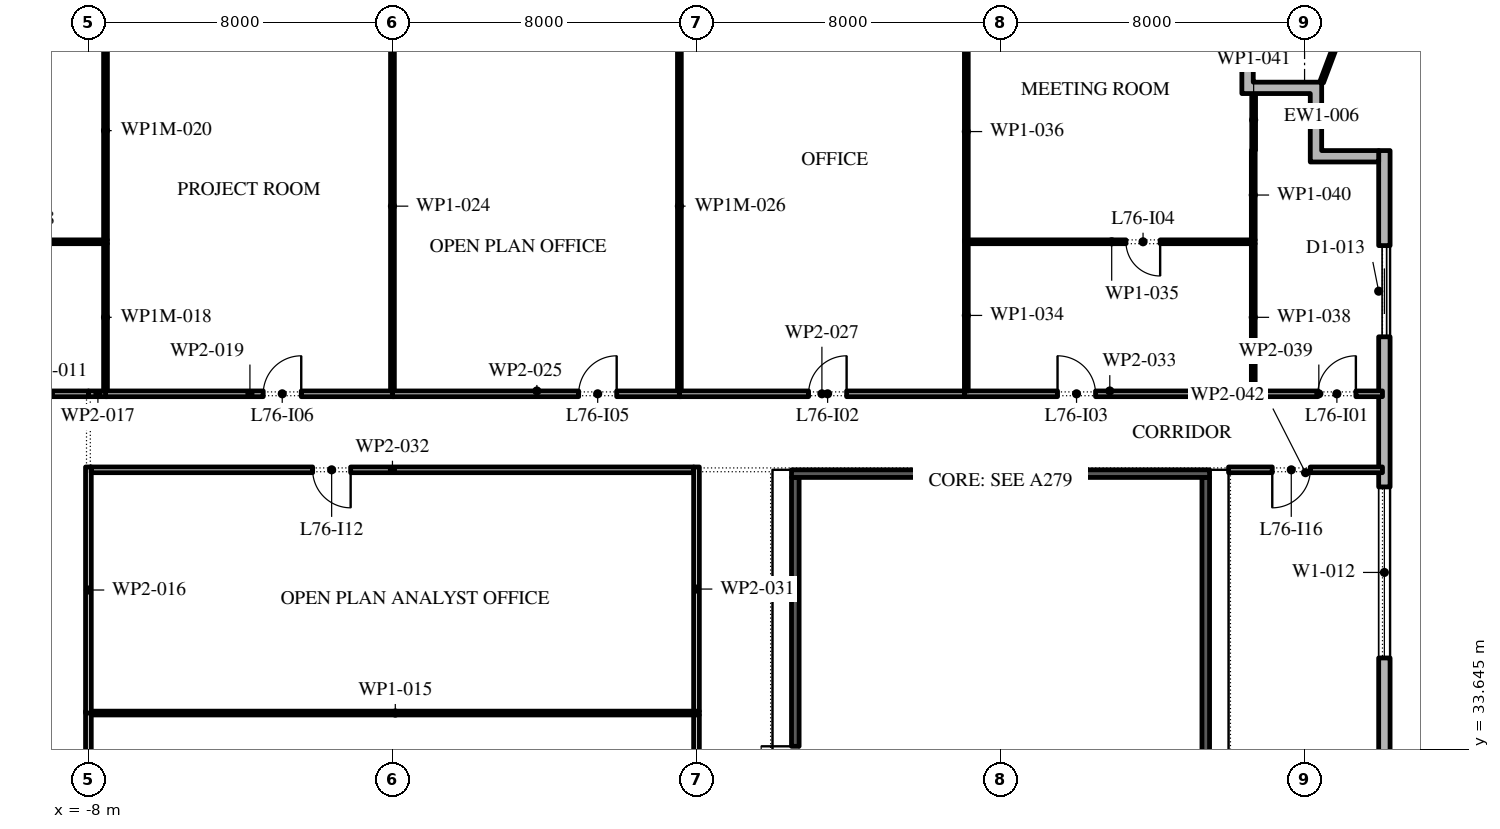
"""IFC4 building model, lengths in metres.
Left out: names, types, materials, properties, quantities, classifications, styles, units other than length and angle.
Written with IfcOpenShell. Run it as: python <this file> out.ifc"""

import sys

from ifc_helpers import new_model, si_unit, direction, frame, frame_2d, origin, place, context, subcontext, project, spatial, polyline, rectangle, outline, extrude, element, fill, save


model = new_model("IFC4")
c1 = context("Model", 3, precision=1e-05, world=origin(), true_north=direction((0.0, 1.0)))
c2 = subcontext(c1, "Body", "Model", "MODEL_VIEW")
j1 = project(units=[si_unit("LENGTHUNIT", "METRE"), si_unit("PLANEANGLEUNIT", "RADIAN")], contexts=[c1])
p1 = place(None, origin())
s1 = spatial("IfcSite", under=j1, at=p1, CompositionType="ELEMENT")
p2 = place(p1, origin())
s2 = spatial("IfcBuilding", under=s1, at=p2, CompositionType="ELEMENT")
p3 = place(p2, frame((0.0, 0.0, 346.8)))
s3 = spatial("IfcBuildingStorey", under=s2, at=p3, CompositionType="ELEMENT", Elevation=346.8)
p4 = place(p3, frame((26.1, -2.1, 0.0), z_axis=(0.0, 0.0, 1.0), x_axis=(0.0, 1.0, 0.0)))
e1 = element("IfcWall", 1, at=p4, inside=s3, PredefinedType="STANDARD", context=c2, shape_type="SweptSolid", body=[
    extrude(rectangle(XDim=51.5, YDim=0.3, at=frame_2d((25.75, 0.0))), origin(), (0.0, 0.0, 1.0), 4.0),
])
p5 = place(p4, frame((1.3, 0.0, 0.45)))
e2 = element("IfcOpeningElement", 2, at=p5, cuts=e1, PredefinedType="OPENING", context=c2, shape_type="SweptSolid", body=[
    extrude(rectangle(XDim=4.5, YDim=3.05, at=frame_2d((2.25, 1.525))), frame((0.0, 0.16, 0.0), z_axis=(0.0, -1.0, 0.0), x_axis=(1.0, 0.0, 0.0)), (0.0, 0.0, 1.0), 0.32),
])
p6 = place(p4, frame((8.55, 0.0, 0.45)))
e3 = element("IfcOpeningElement", 3, at=p6, cuts=e1, PredefinedType="OPENING", context=c2, shape_type="SweptSolid", body=[
    extrude(rectangle(XDim=4.5, YDim=3.05, at=frame_2d((2.25, 1.525))), frame((0.0, 0.16, 0.0), z_axis=(0.0, -1.0, 0.0), x_axis=(1.0, 0.0, 0.0)), (0.0, 0.0, 1.0), 0.32),
])
p7 = place(p4, frame((17.0, 0.0, 0.0)))
e4 = element("IfcOpeningElement", 4, at=p7, cuts=e1, PredefinedType="OPENING", context=c2, shape_type="SweptSolid", body=[
    extrude(rectangle(XDim=2.4, YDim=3.5, at=frame_2d((1.2, 1.75))), frame((0.0, 0.16, 0.0), z_axis=(0.0, -1.0, 0.0), x_axis=(1.0, 0.0, 0.0)), (0.0, 0.0, 1.0), 0.32),
])
p8 = place(p4, frame((23.35, 0.0, 0.45)))
e5 = element("IfcOpeningElement", 5, at=p8, cuts=e1, PredefinedType="OPENING", context=c2, shape_type="SweptSolid", body=[
    extrude(rectangle(XDim=4.5, YDim=3.05, at=frame_2d((2.25, 1.525))), frame((0.0, 0.16, 0.0), z_axis=(0.0, -1.0, 0.0), x_axis=(1.0, 0.0, 0.0)), (0.0, 0.0, 1.0), 0.32),
])
p9 = place(p4, frame((30.75, 0.0, 0.45)))
e6 = element("IfcOpeningElement", 6, at=p9, cuts=e1, PredefinedType="OPENING", context=c2, shape_type="SweptSolid", body=[
    extrude(rectangle(XDim=4.5, YDim=3.05, at=frame_2d((2.25, 1.525))), frame((0.0, 0.16, 0.0), z_axis=(0.0, -1.0, 0.0), x_axis=(1.0, 0.0, 0.0)), (0.0, 0.0, 1.0), 0.32),
])
p10 = place(p4, frame((38.15, 0.0, 0.45)))
e7 = element("IfcOpeningElement", 7, at=p10, cuts=e1, PredefinedType="OPENING", context=c2, shape_type="SweptSolid", body=[
    extrude(rectangle(XDim=4.5, YDim=3.05, at=frame_2d((2.25, 1.525))), frame((0.0, 0.16, 0.0), z_axis=(0.0, -1.0, 0.0), x_axis=(1.0, 0.0, 0.0)), (0.0, 0.0, 1.0), 0.32),
])
p11 = place(p4, frame((46.6, 0.0, 0.0)))
e8 = element("IfcOpeningElement", 8, at=p11, cuts=e1, PredefinedType="OPENING", context=c2, shape_type="SweptSolid", body=[
    extrude(rectangle(XDim=2.4, YDim=3.5, at=frame_2d((1.2, 1.75))), frame((0.0, 0.16, 0.0), z_axis=(0.0, -1.0, 0.0), x_axis=(1.0, 0.0, 0.0)), (0.0, 0.0, 1.0), 0.32),
])
p12 = place(p3, origin())
e9 = element("IfcWall", 9, at=p12, inside=s3, PredefinedType="STANDARD", context=c2, shape_type="SweptSolid", body=[
    extrude(outline(polyline([(24.15, 50.9), (22.35, 50.9), (22.35, 53.0), (22.65, 53.0), (22.65, 51.2), (24.45, 51.2), (24.45, 49.4), (25.95, 49.4), (25.95, 49.1), (24.15, 49.1), (24.15, 50.9)])), origin(), (0.0, 0.0, 1.0), 4.0),
])
p13 = place(p3, frame((24.45, 51.2, -0.05), z_axis=(0.0, 0.0, 1.0), x_axis=(0.352001800812, 0.93599932277, 0.0)))
e10 = element("IfcWall", 10, at=p13, inside=s3, PredefinedType="STANDARD", context=c2, shape_type="SweptSolid", body=[
    extrude(rectangle(XDim=6.091, YDim=0.1, at=frame_2d((3.045, 0.0))), origin(), (0.0, 0.0, 1.0), 4.05),
])
p14 = place(p3, frame((21.4, 25.75, 0.0), z_axis=(0.0, 0.0, 1.0), x_axis=(0.0, 1.0, 0.0)))
e11 = element("IfcWall", 11, at=p14, inside=s3, PredefinedType="SHEAR", context=c2, shape_type="SweptSolid", body=[
    extrude(rectangle(XDim=15.05, YDim=0.2, at=frame_2d((7.525, 0.0))), origin(), (0.0, 0.0, 1.0), 4.0),
])
p15 = place(p3, frame((10.6, 25.75, 0.0), z_axis=(0.0, 0.0, 1.0), x_axis=(0.0, 1.0, 0.0)))
e12 = element("IfcWall", 12, at=p15, inside=s3, PredefinedType="SHEAR", context=c2, shape_type="SweptSolid", body=[
    extrude(rectangle(XDim=15.05, YDim=0.2, at=frame_2d((7.525, 0.0))), origin(), (0.0, 0.0, 1.0), 4.0),
])
p16 = place(p15, frame((7.075, 0.0, 0.0)))
e13 = element("IfcOpeningElement", 13, at=p16, cuts=e12, PredefinedType="OPENING", context=c2, shape_type="SweptSolid", body=[
    extrude(rectangle(XDim=0.9, YDim=2.1, at=frame_2d((0.45, 1.05))), frame((0.0, 0.11, 0.0), z_axis=(0.0, -1.0, 0.0), x_axis=(1.0, 0.0, 0.0)), (0.0, 0.0, 1.0), 0.22),
])
p17 = place(p3, frame((10.5, 40.9, 0.0), z_axis=(0.0, 0.0, 1.0), x_axis=(1.0, 0.0, 0.0)))
e14 = element("IfcWall", 14, at=p17, inside=s3, PredefinedType="SHEAR", context=c2, shape_type="SweptSolid", body=[
    extrude(rectangle(XDim=11.0, YDim=0.2, at=frame_2d((5.5, 0.0))), origin(), (0.0, 0.0, 1.0), 4.0),
])
p18 = place(p3, frame((-15.05, 47.0, 0.0), z_axis=(0.0, 0.0, 1.0), x_axis=(1.0, 0.0, 0.0)))
e15 = element("IfcWall", 15, at=p18, inside=s3, PredefinedType="PARTITIONING", context=c2, shape_type="SweptSolid", body=[
    extrude(rectangle(XDim=7.55, YDim=0.1, at=frame_2d((3.775, 0.0))), origin(), (0.0, 0.0, 1.0), 4.0),
])
p19 = place(p18, frame((4.9, 0.0, 0.0)))
e16 = element("IfcOpeningElement", 16, at=p19, cuts=e15, PredefinedType="OPENING", context=c2, shape_type="SweptSolid", body=[
    extrude(rectangle(XDim=0.9, YDim=2.1, at=frame_2d((0.45, 1.05))), frame((0.0, 0.06, 0.0), z_axis=(0.0, -1.0, 0.0), x_axis=(1.0, 0.0, 0.0)), (0.0, 0.0, 1.0), 0.12),
])
p20 = place(p3, frame((-10.0, 43.0, 0.0), z_axis=(0.0, 0.0, 1.0), x_axis=(1.0, 0.0, 0.0)))
e17 = element("IfcWall", 17, at=p20, inside=s3, PredefinedType="PARTITIONING", context=c2, shape_type="SweptSolid", body=[
    extrude(rectangle(XDim=2.0, YDim=0.15, at=frame_2d((1.0, 0.0))), origin(), (0.0, 0.0, 1.0), 4.0),
])
p21 = place(p3, frame((-8.0, 34.65, 0.0), z_axis=(0.0, 0.0, 1.0), x_axis=(0.0, -1.0, 0.0)))
e18 = element("IfcWall", 18, at=p21, inside=s3, PredefinedType="PARTITIONING", context=c2, shape_type="SweptSolid", body=[
    extrude(rectangle(XDim=8.2, YDim=0.15, at=frame_2d((4.1, 0.0))), origin(), (0.0, 0.0, 1.0), 4.0),
])
p22 = place(p21, frame((2.0, 0.0, 0.0)))
e19 = element("IfcOpeningElement", 19, at=p22, cuts=e18, PredefinedType="OPENING", context=c2, shape_type="SweptSolid", body=[
    extrude(rectangle(XDim=1.0, YDim=2.1, at=frame_2d((0.5, 1.05))), frame((0.0, 0.085, 0.0), z_axis=(0.0, -1.0, 0.0), x_axis=(1.0, 0.0, 0.0)), (0.0, 0.0, 1.0), 0.17),
])
p23 = place(p3, frame((-7.925, 34.6, 0.0), z_axis=(0.0, 0.0, 1.0), x_axis=(1.0, 0.0, 0.0)))
e20 = element("IfcWall", 20, at=p23, inside=s3, PredefinedType="PARTITIONING", context=c2, shape_type="SweptSolid", body=[
    extrude(rectangle(XDim=16.0, YDim=0.1, at=frame_2d((8.0, 0.0))), origin(), (0.0, 0.0, 1.0), 4.0),
])
p24 = place(p3, frame((-8.0, 41.075, 0.0), z_axis=(0.0, 0.0, 1.0), x_axis=(0.0, -1.0, 0.0)))
e21 = element("IfcWall", 21, at=p24, inside=s3, PredefinedType="PARTITIONING", context=c2, shape_type="SweptSolid", body=[
    extrude(rectangle(XDim=6.475, YDim=0.15, at=frame_2d((3.237, 0.0))), origin(), (0.0, 0.0, 1.0), 4.0),
])
p25 = place(p3, frame((-8.0, 43.0, 0.0), z_axis=(0.0, 0.0, 1.0), x_axis=(1.0, 0.0, 0.0)))
e22 = element("IfcWall", 22, at=p25, inside=s3, PredefinedType="PARTITIONING", context=c2, shape_type="SweptSolid", body=[
    extrude(rectangle(XDim=0.5, YDim=0.15, at=frame_2d((0.25, 0.0))), origin(), (0.0, 0.0, 1.0), 4.0),
])
p26 = place(p3, frame((-7.55, 43.075, 0.0), z_axis=(0.0, 0.0, 1.0), x_axis=(0.0, 1.0, 0.0)))
e23 = element("IfcWall", 23, at=p26, inside=s3, PredefinedType="PARTITIONING", context=c2, shape_type="SweptSolid", body=[
    extrude(rectangle(XDim=3.875, YDim=0.1, at=frame_2d((1.938, 0.0))), origin(), (0.0, 0.0, 1.0), 3.096),
])
p27 = place(p3, frame((-7.55, 43.0, 0.0), z_axis=(0.0, 0.0, 1.0), x_axis=(1.0, 0.0, 0.0)))
e24 = element("IfcWall", 24, at=p27, inside=s3, PredefinedType="PARTITIONING", context=c2, shape_type="SweptSolid", body=[
    extrude(rectangle(XDim=7.6, YDim=0.15, at=frame_2d((3.8, 0.0))), origin(), (0.0, 0.0, 1.0), 4.0),
])
p28 = place(p27, frame((4.15, 0.0, 0.0)))
e25 = element("IfcOpeningElement", 25, at=p28, cuts=e24, PredefinedType="OPENING", context=c2, shape_type="SweptSolid", body=[
    extrude(rectangle(XDim=1.0, YDim=2.1, at=frame_2d((0.5, 1.05))), frame((0.0, 0.085, 0.0), z_axis=(0.0, -1.0, 0.0), x_axis=(1.0, 0.0, 0.0)), (0.0, 0.0, 1.0), 0.17),
])
p29 = place(p3, frame((-7.55, 47.05, 0.0), z_axis=(0.0, 0.0, 1.0), x_axis=(0.0, 1.0, 0.0)))
e26 = element("IfcWall", 26, at=p29, inside=s3, PredefinedType="PARTITIONING", context=c2, shape_type="SweptSolid", body=[
    extrude(rectangle(XDim=5.75, YDim=0.1, at=frame_2d((2.875, 0.0))), origin(), (0.0, 0.0, 1.0), 3.096),
])
p30 = place(p3, frame((0.0, 43.075, 0.0), z_axis=(0.0, 0.0, 1.0), x_axis=(0.0, 1.0, 0.0)))
e27 = element("IfcWall", 27, at=p30, inside=s3, PredefinedType="PARTITIONING", context=c2, shape_type="SweptSolid", body=[
    extrude(rectangle(XDim=9.725, YDim=0.1, at=frame_2d((4.863, 0.0))), origin(), (0.0, 0.0, 1.0), 4.0),
])
p31 = place(p3, frame((0.0, 43.0, 0.0), z_axis=(0.0, 0.0, 1.0), x_axis=(1.0, 0.0, 0.0)))
e28 = element("IfcWall", 28, at=p31, inside=s3, PredefinedType="PARTITIONING", context=c2, shape_type="SweptSolid", body=[
    extrude(rectangle(XDim=7.6, YDim=0.15, at=frame_2d((3.8, 0.0))), origin(), (0.0, 0.0, 1.0), 4.0),
])
p32 = place(p31, frame((4.9, 0.0, 0.0)))
e29 = element("IfcOpeningElement", 29, at=p32, cuts=e28, PredefinedType="OPENING", context=c2, shape_type="SweptSolid", body=[
    extrude(rectangle(XDim=1.0, YDim=2.1, at=frame_2d((0.5, 1.05))), frame((0.0, 0.085, 0.0), z_axis=(0.0, -1.0, 0.0), x_axis=(1.0, 0.0, 0.0)), (0.0, 0.0, 1.0), 0.17),
])
p33 = place(p3, frame((7.55, 43.075, 0.0), z_axis=(0.0, 0.0, 1.0), x_axis=(0.0, 1.0, 0.0)))
e30 = element("IfcWall", 30, at=p33, inside=s3, PredefinedType="PARTITIONING", context=c2, shape_type="SweptSolid", body=[
    extrude(rectangle(XDim=9.725, YDim=0.1, at=frame_2d((4.863, 0.0))), origin(), (0.0, 0.0, 1.0), 3.096),
])
p34 = place(p3, frame((7.55, 43.0, 0.0), z_axis=(0.0, 0.0, 1.0), x_axis=(1.0, 0.0, 0.0)))
e31 = element("IfcWall", 31, at=p34, inside=s3, PredefinedType="PARTITIONING", context=c2, shape_type="SweptSolid", body=[
    extrude(rectangle(XDim=7.5, YDim=0.15, at=frame_2d((3.75, 0.0))), origin(), (0.0, 0.0, 1.0), 4.0),
])
p35 = place(p34, frame((3.4, 0.0, 0.0)))
e32 = element("IfcOpeningElement", 32, at=p35, cuts=e31, PredefinedType="OPENING", context=c2, shape_type="SweptSolid", body=[
    extrude(rectangle(XDim=1.0, YDim=2.1, at=frame_2d((0.5, 1.05))), frame((0.0, 0.085, 0.0), z_axis=(0.0, -1.0, 0.0), x_axis=(1.0, 0.0, 0.0)), (0.0, 0.0, 1.0), 0.17),
])
p36 = place(p3, frame((8.0, 26.5, 0.0), z_axis=(0.0, 0.0, 1.0), x_axis=(0.0, 1.0, 0.0)))
e33 = element("IfcWall", 33, at=p36, inside=s3, PredefinedType="PARTITIONING", context=c2, shape_type="SweptSolid", body=[
    extrude(rectangle(XDim=8.05, YDim=0.15, at=frame_2d((4.025, 0.0))), origin(), (0.0, 0.0, 1.0), 4.0),
])
p37 = place(p3, frame((8.0, 34.65, 0.0), z_axis=(0.0, 0.0, 1.0), x_axis=(0.0, 1.0, 0.0)))
e34 = element("IfcWall", 34, at=p37, inside=s3, PredefinedType="PARTITIONING", context=c2, shape_type="SweptSolid", body=[
    extrude(rectangle(XDim=6.425, YDim=0.15, at=frame_2d((3.212, 0.0))), origin(), (0.0, 0.0, 1.0), 4.0),
])
p38 = place(p3, frame((7.925, 41.0, 0.0), z_axis=(0.0, 0.0, 1.0), x_axis=(-1.0, 0.0, 0.0)))
e35 = element("IfcWall", 35, at=p38, inside=s3, PredefinedType="PARTITIONING", context=c2, shape_type="SweptSolid", body=[
    extrude(rectangle(XDim=15.85, YDim=0.15, at=frame_2d((7.925, 0.0))), origin(), (0.0, 0.0, 1.0), 4.0),
])
p39 = place(p38, frame((9.025, 0.0, 0.0)))
e36 = element("IfcOpeningElement", 36, at=p39, cuts=e35, PredefinedType="OPENING", context=c2, shape_type="SweptSolid", body=[
    extrude(rectangle(XDim=1.0, YDim=2.1, at=frame_2d((0.5, 1.05))), frame((0.0, 0.085, 0.0), z_axis=(0.0, -1.0, 0.0), x_axis=(1.0, 0.0, 0.0)), (0.0, 0.0, 1.0), 0.17),
])
p40 = place(p3, frame((15.05, 43.0, 0.0), z_axis=(0.0, 0.0, 1.0), x_axis=(1.0, 0.0, 0.0)))
e37 = element("IfcWall", 37, at=p40, inside=s3, PredefinedType="PARTITIONING", context=c2, shape_type="SweptSolid", body=[
    extrude(rectangle(XDim=7.65, YDim=0.15, at=frame_2d((3.825, 0.0))), origin(), (0.0, 0.0, 1.0), 4.0),
])
p41 = place(p40, frame((2.45, 0.0, 0.0)))
e38 = element("IfcOpeningElement", 38, at=p41, cuts=e37, PredefinedType="OPENING", context=c2, shape_type="SweptSolid", body=[
    extrude(rectangle(XDim=1.0, YDim=2.1, at=frame_2d((0.5, 1.05))), frame((0.0, 0.085, 0.0), z_axis=(0.0, -1.0, 0.0), x_axis=(1.0, 0.0, 0.0)), (0.0, 0.0, 1.0), 0.17),
])
p42 = place(p3, frame((15.1, 47.05, 0.0), z_axis=(0.0, 0.0, 1.0), x_axis=(0.0, -1.0, 0.0)))
e39 = element("IfcWall", 39, at=p42, inside=s3, PredefinedType="PARTITIONING", context=c2, shape_type="SweptSolid", body=[
    extrude(rectangle(XDim=3.975, YDim=0.1, at=frame_2d((1.988, 0.0))), origin(), (0.0, 0.0, 1.0), 4.0),
])
p43 = place(p3, frame((15.15, 47.0, 0.0), z_axis=(0.0, 0.0, 1.0), x_axis=(1.0, 0.0, 0.0)))
e40 = element("IfcWall", 40, at=p43, inside=s3, PredefinedType="PARTITIONING", context=c2, shape_type="SweptSolid", body=[
    extrude(rectangle(XDim=7.55, YDim=0.1, at=frame_2d((3.775, 0.0))), origin(), (0.0, 0.0, 1.0), 4.0),
])
p44 = place(p43, frame((4.15, 0.0, 0.0)))
e41 = element("IfcOpeningElement", 41, at=p44, cuts=e40, PredefinedType="OPENING", context=c2, shape_type="SweptSolid", body=[
    extrude(rectangle(XDim=0.9, YDim=2.1, at=frame_2d((0.45, 1.05))), frame((0.0, 0.06, 0.0), z_axis=(0.0, -1.0, 0.0), x_axis=(1.0, 0.0, 0.0)), (0.0, 0.0, 1.0), 0.12),
])
p45 = place(p3, frame((15.1, 52.8, 0.0), z_axis=(0.0, 0.0, 1.0), x_axis=(0.0, -1.0, 0.0)))
e42 = element("IfcWall", 42, at=p45, inside=s3, PredefinedType="PARTITIONING", context=c2, shape_type="SweptSolid", body=[
    extrude(rectangle(XDim=5.8, YDim=0.1, at=frame_2d((2.9, 0.0))), origin(), (0.0, 0.0, 1.0), 4.0),
])
p46 = place(p3, frame((22.65, 43.075, 0.0), z_axis=(0.0, 0.0, 1.0), x_axis=(0.0, 1.0, 0.0)))
e43 = element("IfcWall", 43, at=p46, inside=s3, PredefinedType="PARTITIONING", context=c2, shape_type="SweptSolid", body=[
    extrude(rectangle(XDim=3.875, YDim=0.1, at=frame_2d((1.938, 0.0))), origin(), (0.0, 0.0, 1.0), 4.0),
])
p47 = place(p3, frame((22.7, 43.0, 0.0), z_axis=(0.0, 0.0, 1.0), x_axis=(1.0, 0.0, 0.0)))
e44 = element("IfcWall", 44, at=p47, inside=s3, PredefinedType="PARTITIONING", context=c2, shape_type="SweptSolid", body=[
    extrude(rectangle(XDim=3.35, YDim=0.15, at=frame_2d((1.675, 0.0))), origin(), (0.0, 0.0, 1.0), 4.0),
])
p48 = place(p47, frame((1.65, 0.0, 0.0)))
e45 = element("IfcOpeningElement", 45, at=p48, cuts=e44, PredefinedType="OPENING", context=c2, shape_type="SweptSolid", body=[
    extrude(rectangle(XDim=1.0, YDim=2.1, at=frame_2d((0.5, 1.05))), frame((0.0, 0.085, 0.0), z_axis=(0.0, -1.0, 0.0), x_axis=(1.0, 0.0, 0.0)), (0.0, 0.0, 1.0), 0.17),
])
p49 = place(p3, frame((22.65, 47.05, 0.0), z_axis=(0.0, 0.0, 1.0), x_axis=(0.0, 1.0, 0.0)))
e46 = element("IfcWall", 46, at=p49, inside=s3, PredefinedType="PARTITIONING", context=c2, shape_type="SweptSolid", body=[
    extrude(rectangle(XDim=2.36, YDim=0.1, at=frame_2d((1.18, 0.0))), origin(), (0.0, 0.0, 1.0), 4.0),
])
p50 = place(p3, frame((22.66, 49.41, 0.0), z_axis=(0.0, 0.0, 1.0), x_axis=(0.0, 1.0, 0.0)))
e47 = element("IfcWall", 47, at=p50, inside=s3, PredefinedType="PARTITIONING", context=c2, shape_type="SweptSolid", body=[
    extrude(rectangle(XDim=1.59, YDim=0.1, at=frame_2d((0.795, 0.0))), origin(), (0.0, 0.0, 1.0), 4.0),
])
p51 = place(p3, frame((26.05, 41.0, 0.0), z_axis=(0.0, 0.0, 1.0), x_axis=(-1.0, 0.0, 0.0)))
e48 = element("IfcWall", 48, at=p51, inside=s3, PredefinedType="PARTITIONING", context=c2, shape_type="SweptSolid", body=[
    extrude(rectangle(XDim=4.05, YDim=0.15, at=frame_2d((2.025, 0.0))), origin(), (0.0, 0.0, 1.0), 4.0),
])
p52 = place(p51, frame((1.9, 0.0, 0.0)))
e49 = element("IfcOpeningElement", 49, at=p52, cuts=e48, PredefinedType="OPENING", context=c2, shape_type="SweptSolid", body=[
    extrude(rectangle(XDim=1.0, YDim=2.1, at=frame_2d((0.5, 1.05))), frame((0.0, 0.085, 0.0), z_axis=(0.0, -1.0, 0.0), x_axis=(1.0, 0.0, 0.0)), (0.0, 0.0, 1.0), 0.17),
])
p53 = place(p10, origin())
e50 = element("IfcWindow", 50, at=p53, inside=s3, PartitioningType="DOUBLE_PANEL_VERTICAL", PredefinedType="WINDOW", context=c2, shape_type="SweptSolid", body=[
    extrude(rectangle(XDim=4.5, YDim=3.05, at=frame_2d((2.25, 1.525))), frame((0.0, 0.03, 0.0), z_axis=(0.0, -1.0, 0.0), x_axis=(1.0, 0.0, 0.0)), (0.0, 0.0, 1.0), 0.06),
])
fill(e7, e50)
p54 = place(p11, origin())
e51 = element("IfcDoor", 51, at=p54, inside=s3, OperationType="DOUBLE_DOOR_SLIDING", PredefinedType="DOOR", context=c2, shape_type="SweptSolid", body=[
    extrude(rectangle(XDim=2.4, YDim=3.5, at=frame_2d((1.2, 1.75))), frame((0.0, 0.025, 0.0), z_axis=(0.0, -1.0, 0.0), x_axis=(1.0, 0.0, 0.0)), (0.0, 0.0, 1.0), 0.05),
])
fill(e8, e51)
p55 = place(p16, origin())
e52 = element("IfcDoor", 52, at=p55, inside=s3, OperationType="SINGLE_SWING_LEFT", PredefinedType="DOOR", context=c2, shape_type="SweptSolid", body=[
    extrude(rectangle(XDim=0.9, YDim=2.1, at=frame_2d((0.45, 1.05))), frame((0.0, -0.05, 0.0), z_axis=(0.0, -1.0, 0.0), x_axis=(1.0, 0.0, 0.0)), (0.0, 0.0, 1.0), 0.05),
])
fill(e13, e52)
p56 = place(p48, origin())
e53 = element("IfcDoor", 53, at=p56, inside=s3, OperationType="SINGLE_SWING_LEFT", PredefinedType="DOOR", context=c2, shape_type="SweptSolid", body=[
    extrude(rectangle(XDim=1.0, YDim=2.1, at=frame_2d((0.5, 1.05))), frame((0.0, 0.025, 0.0), z_axis=(0.0, -1.0, 0.0), x_axis=(1.0, 0.0, 0.0)), (0.0, 0.0, 1.0), 0.05),
])
fill(e45, e53)
p57 = place(p35, origin())
e54 = element("IfcDoor", 54, at=p57, inside=s3, OperationType="SINGLE_SWING_LEFT", PredefinedType="DOOR", context=c2, shape_type="SweptSolid", body=[
    extrude(rectangle(XDim=1.0, YDim=2.1, at=frame_2d((0.5, 1.05))), frame((0.0, 0.025, 0.0), z_axis=(0.0, -1.0, 0.0), x_axis=(1.0, 0.0, 0.0)), (0.0, 0.0, 1.0), 0.05),
])
fill(e32, e54)
p58 = place(p41, origin())
e55 = element("IfcDoor", 55, at=p58, inside=s3, OperationType="SINGLE_SWING_RIGHT", PredefinedType="DOOR", context=c2, shape_type="SweptSolid", body=[
    extrude(rectangle(XDim=1.0, YDim=2.1, at=frame_2d((0.5, 1.05))), frame((0.0, 0.025, 0.0), z_axis=(0.0, -1.0, 0.0), x_axis=(1.0, 0.0, 0.0)), (0.0, 0.0, 1.0), 0.05),
])
fill(e38, e55)
p59 = place(p44, frame((0.9, 0.0, 0.0), z_axis=(0.0, 0.0, 1.0), x_axis=(-1.0, 0.0, 0.0)))
e56 = element("IfcDoor", 56, at=p59, inside=s3, OperationType="SINGLE_SWING_RIGHT", PredefinedType="DOOR", context=c2, shape_type="SweptSolid", body=[
    extrude(rectangle(XDim=0.9, YDim=2.1, at=frame_2d((0.45, 1.05))), frame((0.0, 0.025, 0.0), z_axis=(0.0, -1.0, 0.0), x_axis=(1.0, 0.0, 0.0)), (0.0, 0.0, 1.0), 0.05),
])
fill(e41, e56)
p60 = place(p32, origin())
e57 = element("IfcDoor", 57, at=p60, inside=s3, OperationType="SINGLE_SWING_LEFT", PredefinedType="DOOR", context=c2, shape_type="SweptSolid", body=[
    extrude(rectangle(XDim=1.0, YDim=2.1, at=frame_2d((0.5, 1.05))), frame((0.0, 0.025, 0.0), z_axis=(0.0, -1.0, 0.0), x_axis=(1.0, 0.0, 0.0)), (0.0, 0.0, 1.0), 0.05),
])
fill(e29, e57)
p61 = place(p28, origin())
e58 = element("IfcDoor", 58, at=p61, inside=s3, OperationType="SINGLE_SWING_LEFT", PredefinedType="DOOR", context=c2, shape_type="SweptSolid", body=[
    extrude(rectangle(XDim=1.0, YDim=2.1, at=frame_2d((0.5, 1.05))), frame((0.0, 0.025, 0.0), z_axis=(0.0, -1.0, 0.0), x_axis=(1.0, 0.0, 0.0)), (0.0, 0.0, 1.0), 0.05),
])
fill(e25, e58)
p62 = place(p39, origin())
e59 = element("IfcDoor", 59, at=p62, inside=s3, OperationType="SINGLE_SWING_RIGHT", PredefinedType="DOOR", context=c2, shape_type="SweptSolid", body=[
    extrude(rectangle(XDim=1.0, YDim=2.1, at=frame_2d((0.5, 1.05))), frame((0.0, 0.025, 0.0), z_axis=(0.0, -1.0, 0.0), x_axis=(1.0, 0.0, 0.0)), (0.0, 0.0, 1.0), 0.05),
])
fill(e36, e59)
p63 = place(p52, origin())
e60 = element("IfcDoor", 60, at=p63, inside=s3, OperationType="SINGLE_SWING_LEFT", PredefinedType="DOOR", context=c2, shape_type="SweptSolid", body=[
    extrude(rectangle(XDim=1.0, YDim=2.1, at=frame_2d((0.5, 1.05))), frame((0.0, 0.025, 0.0), z_axis=(0.0, -1.0, 0.0), x_axis=(1.0, 0.0, 0.0)), (0.0, 0.0, 1.0), 0.05),
])
fill(e49, e60)
save(model, sys.argv[1])
